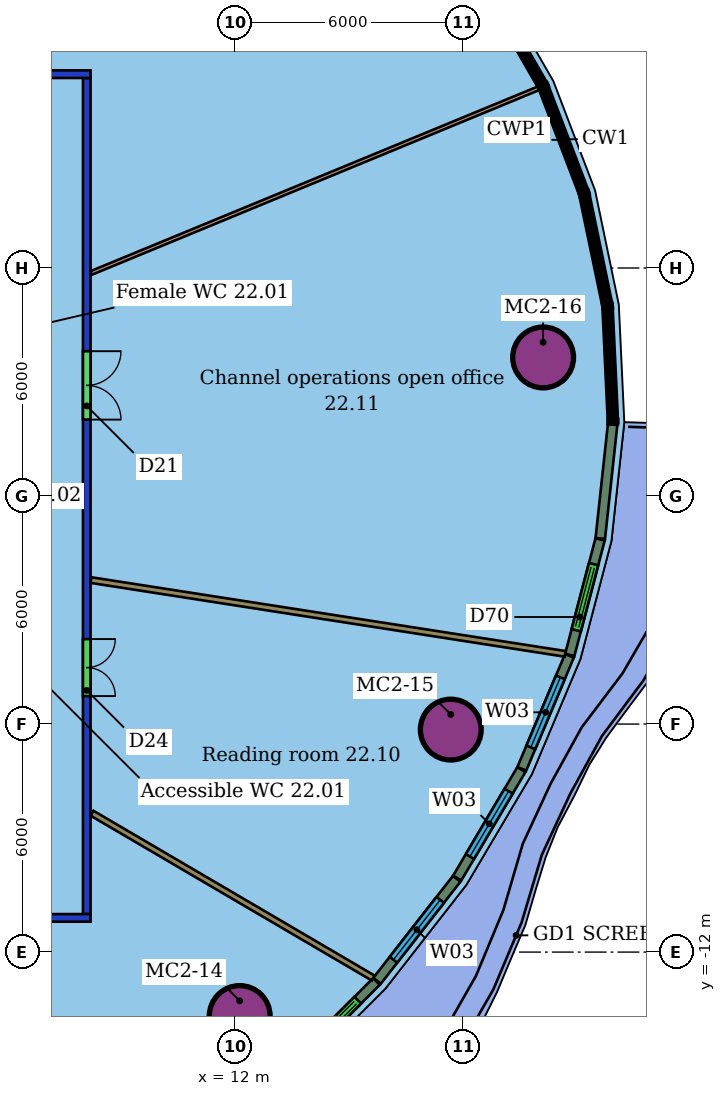
"""IFC4 building model, lengths in metres.
Left out: names, types, materials, properties, quantities, classifications, styles, units other than length and angle.
Written with IfcOpenShell. Run it as: python <this file> out.ifc"""

import sys

from ifc_helpers import new_model, si_unit, direction, frame, frame_2d, origin, origin_2d, place, context, subcontext, project, spatial, rectangle, hollow_circle, extrude, element, fill, save


model = new_model("IFC4")
c1 = context("Model", 3, precision=1e-05, world=origin(), true_north=direction((0.0, 1.0)))
c2 = subcontext(c1, "Body", "Model", "MODEL_VIEW")
j1 = project(units=[si_unit("LENGTHUNIT", "METRE"), si_unit("PLANEANGLEUNIT", "RADIAN")], contexts=[c1])
p1 = place(None, origin())
s1 = spatial("IfcSite", under=j1, at=p1, CompositionType="ELEMENT")
p2 = place(p1, origin())
s2 = spatial("IfcBuilding", under=s1, at=p2, CompositionType="ELEMENT")
p3 = place(p2, frame((0.0, 0.0, 99.4)))
s3 = spatial("IfcBuildingStorey", under=s2, at=p3, CompositionType="ELEMENT", Elevation=99.4)
for number, where, z_axis, x_axis in (
    (1, (12.125, -13.683, 0.0), (0.0, 0.0, 1.0), (1.0, 0.0, 0.0)),
    (2, (17.679, -6.146, 0.0), (0.0, 0.0, 1.0), (1.0, 0.0, 0.0)),
    (3, (20.109, 3.646, 0.0), (0.0, 0.0, 1.0), (1.0, 0.0, 0.0)),
):
    element("IfcColumn", number, at=place(p3, frame(where, z_axis=z_axis, x_axis=x_axis)), inside=s3, PredefinedType="COLUMN", context=c2, shape_type="SweptSolid", body=[
        extrude(hollow_circle(Radius=0.8, WallThickness=0.055, at=origin_2d()), origin(), (0.0, 0.0, 1.0), 3.45),
    ])
p4 = place(p3, frame((8.2, -11.1, 0.0), z_axis=(0.0, 0.0, 1.0), x_axis=(-1.0, 0.0, 0.0)))
e4 = element("IfcWall", 4, at=p4, inside=s3, PredefinedType="PARTITIONING", context=c2, shape_type="SweptSolid", body=[
    extrude(rectangle(XDim=28.4, YDim=0.2, at=frame_2d((14.2, 0.0))), origin(), (0.0, 0.0, 1.0), 3.0),
])
p5 = place(p4, frame((19.333, 0.0, 0.0)))
e5 = element("IfcOpeningElement", 5, at=p5, cuts=e4, PredefinedType="OPENING", context=c2, shape_type="SweptSolid", body=[
    extrude(rectangle(XDim=1.0, YDim=2.1, at=frame_2d((0.5, 1.05))), frame((0.0, 0.11, 0.0), z_axis=(0.0, -1.0, 0.0), x_axis=(1.0, 0.0, 0.0)), (0.0, 0.0, 1.0), 0.22),
])
p6 = place(p4, frame((9.983, 0.0, 0.0)))
e6 = element("IfcOpeningElement", 6, at=p6, cuts=e4, PredefinedType="OPENING", context=c2, shape_type="SweptSolid", body=[
    extrude(rectangle(XDim=1.8, YDim=2.1, at=frame_2d((0.9, 1.05))), frame((0.0, 0.11, 0.0), z_axis=(0.0, -1.0, 0.0), x_axis=(1.0, 0.0, 0.0)), (0.0, 0.0, 1.0), 0.22),
])
p7 = place(p3, frame((-20.2, 11.1, 0.0), z_axis=(0.0, 0.0, 1.0), x_axis=(1.0, 0.0, 0.0)))
e7 = element("IfcWall", 7, at=p7, inside=s3, PredefinedType="PARTITIONING", context=c2, shape_type="SweptSolid", body=[
    extrude(rectangle(XDim=28.4, YDim=0.2, at=frame_2d((14.2, 0.0))), origin(), (0.0, 0.0, 1.0), 3.0),
])
p8 = place(p7, frame((22.072, 0.0, 0.0)))
e8 = element("IfcOpeningElement", 8, at=p8, cuts=e7, PredefinedType="OPENING", context=c2, shape_type="SweptSolid", body=[
    extrude(rectangle(XDim=1.8, YDim=2.1, at=frame_2d((0.9, 1.05))), frame((0.0, 0.11, 0.0), z_axis=(0.0, -1.0, 0.0), x_axis=(1.0, 0.0, 0.0)), (0.0, 0.0, 1.0), 0.22),
])
p9 = place(p7, frame((16.343, 0.0, 0.0)))
e9 = element("IfcOpeningElement", 9, at=p9, cuts=e7, PredefinedType="OPENING", context=c2, shape_type="SweptSolid", body=[
    extrude(rectangle(XDim=1.0, YDim=2.1, at=frame_2d((0.5, 1.05))), frame((0.0, 0.11, 0.0), z_axis=(0.0, -1.0, 0.0), x_axis=(1.0, 0.0, 0.0)), (0.0, 0.0, 1.0), 0.22),
])
p10 = place(p7, frame((7.687, 0.0, 0.0)))
e10 = element("IfcOpeningElement", 10, at=p10, cuts=e7, PredefinedType="OPENING", context=c2, shape_type="SweptSolid", body=[
    extrude(rectangle(XDim=1.0, YDim=2.4, at=frame_2d((0.5, 1.2))), frame((0.0, 0.11, 0.0), z_axis=(0.0, -1.0, 0.0), x_axis=(1.0, 0.0, 0.0)), (0.0, 0.0, 1.0), 0.22),
])
p11 = place(p7, frame((3.746, 0.0, 0.0)))
e11 = element("IfcOpeningElement", 11, at=p11, cuts=e7, PredefinedType="OPENING", context=c2, shape_type="SweptSolid", body=[
    extrude(rectangle(XDim=0.9, YDim=2.1, at=frame_2d((0.45, 1.05))), frame((0.0, 0.11, 0.0), z_axis=(0.0, -1.0, 0.0), x_axis=(1.0, 0.0, 0.0)), (0.0, 0.0, 1.0), 0.22),
])
p12 = place(p3, frame((8.1, 11.0, 0.0), z_axis=(0.0, 0.0, 1.0), x_axis=(0.0, -1.0, 0.0)))
e12 = element("IfcWall", 12, at=p12, inside=s3, PredefinedType="PARTITIONING", context=c2, shape_type="SweptSolid", body=[
    extrude(rectangle(XDim=22.0, YDim=0.2, at=frame_2d((11.0, 0.0))), origin(), (0.0, 0.0, 1.0), 3.0),
])
p13 = place(p12, frame((14.764, 0.0, 0.0)))
e13 = element("IfcOpeningElement", 13, at=p13, cuts=e12, PredefinedType="OPENING", context=c2, shape_type="SweptSolid", body=[
    extrude(rectangle(XDim=1.5, YDim=2.1, at=frame_2d((0.75, 1.05))), frame((0.0, 0.11, 0.0), z_axis=(0.0, -1.0, 0.0), x_axis=(1.0, 0.0, 0.0)), (0.0, 0.0, 1.0), 0.22),
])
p14 = place(p12, frame((7.189, 0.0, 0.0)))
e14 = element("IfcOpeningElement", 14, at=p14, cuts=e12, PredefinedType="OPENING", context=c2, shape_type="SweptSolid", body=[
    extrude(rectangle(XDim=1.8, YDim=2.1, at=frame_2d((0.9, 1.05))), frame((0.0, 0.11, 0.0), z_axis=(0.0, -1.0, 0.0), x_axis=(1.0, 0.0, 0.0)), (0.0, 0.0, 1.0), 0.22),
])
p15 = place(p3, frame((19.996, 10.732, 0.0), z_axis=(0.0, 0.0, 1.0), x_axis=(-0.924331668554, -0.381590050325, 0.0)))
e15 = element("IfcWall", 15, at=p15, inside=s3, PredefinedType="PARTITIONING", context=c2, shape_type="SweptSolid", body=[
    extrude(rectangle(XDim=12.741, YDim=0.1, at=frame_2d((6.371, 0.0))), origin(), (0.0, 0.0, 1.0), 3.45),
])
p16 = place(p3, frame((15.637, -12.683, 0.0), z_axis=(0.0, 0.0, 1.0), x_axis=(-0.862707391, 0.505703428418, 0.0)))
e16 = element("IfcWall", 16, at=p16, inside=s3, PredefinedType="PARTITIONING", context=c2, shape_type="SweptSolid", body=[
    extrude(rectangle(XDim=8.577, YDim=0.15, at=frame_2d((4.289, 0.0))), origin(), (0.0, 0.0, 1.0), 3.45),
])
p17 = place(p3, frame((20.688, -4.153, 0.0), z_axis=(0.0, 0.0, 1.0), x_axis=(-0.988106221153, 0.153772870555, 0.0)))
e17 = element("IfcWall", 17, at=p17, inside=s3, PredefinedType="PARTITIONING", context=c2, shape_type="SweptSolid", body=[
    extrude(rectangle(XDim=12.627, YDim=0.15, at=frame_2d((6.313, 0.0))), origin(), (0.0, 0.0, 1.0), 3.45),
])
p18 = place(p3, frame((13.255, -15.243, 0.0), z_axis=(0.0, 0.0, 1.0), x_axis=(0.706861980523, 0.70735149713, 0.0)))
e18 = element("IfcWall", 18, at=p18, inside=s3, PredefinedType="SOLIDWALL", context=c2, shape_type="SweptSolid", body=[
    extrude(rectangle(XDim=3.491, YDim=0.25, at=frame_2d((1.746, 0.0))), origin(), (0.0, 0.0, 1.0), 3.05),
])
p19 = place(p18, frame((0.996, 0.0, 0.0)))
e19 = element("IfcOpeningElement", 19, at=p19, cuts=e18, PredefinedType="OPENING", context=c2, shape_type="SweptSolid", body=[
    extrude(rectangle(XDim=1.8, YDim=2.4, at=frame_2d((0.9, 1.2))), frame((0.0, 0.135, 0.0), z_axis=(0.0, -1.0, 0.0), x_axis=(1.0, 0.0, 0.0)), (0.0, 0.0, 1.0), 0.27),
])
p20 = place(p3, frame((15.738, -12.757, 0.0), z_axis=(0.0, 0.0, 1.0), x_axis=(0.615358853005, 0.788247094525, 0.0)))
e20 = element("IfcWall", 20, at=p20, inside=s3, PredefinedType="SOLIDWALL", context=c2, shape_type="SweptSolid", body=[
    extrude(rectangle(XDim=3.406, YDim=0.25, at=frame_2d((1.703, 0.0))), origin(), (0.0, 0.0, 1.0), 3.05),
])
p21 = place(p20, frame((0.703, 0.0, 0.9)))
e21 = element("IfcOpeningElement", 21, at=p21, cuts=e20, PredefinedType="OPENING", context=c2, shape_type="SweptSolid", body=[
    extrude(rectangle(XDim=2.0, YDim=2.1, at=frame_2d((1.0, 1.05))), frame((0.0, 0.135, 0.0), z_axis=(0.0, -1.0, 0.0), x_axis=(1.0, 0.0, 0.0)), (0.0, 0.0, 1.0), 0.27),
])
p22 = place(p3, frame((17.848, -10.052, 0.0), z_axis=(0.0, 0.0, 1.0), x_axis=(0.509364300132, 0.860550991953, 0.0)))
e22 = element("IfcWall", 22, at=p22, inside=s3, PredefinedType="SOLIDWALL", context=c2, shape_type="SweptSolid", body=[
    extrude(rectangle(XDim=3.315, YDim=0.25, at=frame_2d((1.658, 0.0))), origin(), (0.0, 0.0, 1.0), 3.05),
])
p23 = place(p22, frame((0.658, 0.0, 0.9)))
e23 = element("IfcOpeningElement", 23, at=p23, cuts=e22, PredefinedType="OPENING", context=c2, shape_type="SweptSolid", body=[
    extrude(rectangle(XDim=2.0, YDim=2.1, at=frame_2d((1.0, 1.05))), frame((0.0, 0.135, 0.0), z_axis=(0.0, -1.0, 0.0), x_axis=(1.0, 0.0, 0.0)), (0.0, 0.0, 1.0), 0.27),
])
p24 = place(p3, frame((19.548, -7.177, 0.0), z_axis=(0.0, 0.0, 1.0), x_axis=(0.388723599909, 0.921354417623, 0.0)))
e24 = element("IfcWall", 24, at=p24, inside=s3, PredefinedType="SOLIDWALL", context=c2, shape_type="SweptSolid", body=[
    extrude(rectangle(XDim=3.225, YDim=0.25, at=frame_2d((1.613, 0.0))), origin(), (0.0, 0.0, 1.0), 3.05),
])
p25 = place(p24, frame((0.613, 0.0, 0.9)))
e25 = element("IfcOpeningElement", 25, at=p25, cuts=e24, PredefinedType="OPENING", context=c2, shape_type="SweptSolid", body=[
    extrude(rectangle(XDim=2.0, YDim=2.1, at=frame_2d((1.0, 1.05))), frame((0.0, 0.135, 0.0), z_axis=(0.0, -1.0, 0.0), x_axis=(1.0, 0.0, 0.0)), (0.0, 0.0, 1.0), 0.27),
])
p26 = place(p3, frame((20.81, -4.181, 0.0), z_axis=(0.0, 0.0, 1.0), x_axis=(0.25414525883, 0.967166059896, 0.0)))
e26 = element("IfcWall", 26, at=p26, inside=s3, PredefinedType="SOLIDWALL", context=c2, shape_type="SweptSolid", body=[
    extrude(rectangle(XDim=3.142, YDim=0.25, at=frame_2d((1.571, 0.0))), origin(), (0.0, 0.0, 1.0), 3.05),
])
p27 = place(p26, frame((0.671, 0.0, 0.0)))
e27 = element("IfcOpeningElement", 27, at=p27, cuts=e26, PredefinedType="OPENING", context=c2, shape_type="SweptSolid", body=[
    extrude(rectangle(XDim=1.8, YDim=2.4, at=frame_2d((0.9, 1.2))), frame((0.0, 0.135, 0.0), z_axis=(0.0, -1.0, 0.0), x_axis=(1.0, 0.0, 0.0)), (0.0, 0.0, 1.0), 0.27),
])
p28 = place(p3, frame((21.613, -1.116, 0.0), z_axis=(0.0, 0.0, 1.0), x_axis=(0.107752917702, 0.994177704803, 0.0)))
e28 = element("IfcWall", 28, at=p28, inside=s3, PredefinedType="SOLIDWALL", context=c2, shape_type="SweptSolid", body=[
    extrude(rectangle(XDim=3.031, YDim=0.25, at=frame_2d((1.516, 0.0))), origin(), (0.0, 0.0, 1.0), 3.05),
])
p29 = place(p13, origin())
e29 = element("IfcDoor", 29, at=p29, inside=s3, OperationType="DOUBLE_DOOR_SINGLE_SWING", PredefinedType="DOOR", context=c2, shape_type="SweptSolid", body=[
    extrude(rectangle(XDim=1.5, YDim=2.1, at=frame_2d((0.75, 1.05))), frame((0.0, 0.025, 0.0), z_axis=(0.0, -1.0, 0.0), x_axis=(1.0, 0.0, 0.0)), (0.0, 0.0, 1.0), 0.05),
])
fill(e13, e29)
p30 = place(p14, origin())
e30 = element("IfcDoor", 30, at=p30, inside=s3, OperationType="DOUBLE_DOOR_SINGLE_SWING", PredefinedType="DOOR", context=c2, shape_type="SweptSolid", body=[
    extrude(rectangle(XDim=1.8, YDim=2.1, at=frame_2d((0.9, 1.05))), frame((0.0, 0.025, 0.0), z_axis=(0.0, -1.0, 0.0), x_axis=(1.0, 0.0, 0.0)), (0.0, 0.0, 1.0), 0.05),
])
fill(e14, e30)
p31 = place(p19, origin())
e31 = element("IfcDoor", 31, at=p31, inside=s3, OperationType="DOUBLE_DOOR_SLIDING", PredefinedType="DOOR", context=c2, shape_type="SweptSolid", body=[
    extrude(rectangle(XDim=1.8, YDim=2.4, at=frame_2d((0.9, 1.2))), frame((0.0, 0.025, 0.0), z_axis=(0.0, -1.0, 0.0), x_axis=(1.0, 0.0, 0.0)), (0.0, 0.0, 1.0), 0.05),
])
fill(e19, e31)
p32 = place(p21, origin())
e32 = element("IfcWindow", 32, at=p32, inside=s3, PartitioningType="SINGLE_PANEL", PredefinedType="WINDOW", context=c2, shape_type="SweptSolid", body=[
    extrude(rectangle(XDim=2.0, YDim=2.1, at=frame_2d((1.0, 1.05))), frame((0.0, 0.03, 0.0), z_axis=(0.0, -1.0, 0.0), x_axis=(1.0, 0.0, 0.0)), (0.0, 0.0, 1.0), 0.06),
])
fill(e21, e32)
p33 = place(p23, origin())
e33 = element("IfcWindow", 33, at=p33, inside=s3, PartitioningType="SINGLE_PANEL", PredefinedType="WINDOW", context=c2, shape_type="SweptSolid", body=[
    extrude(rectangle(XDim=2.0, YDim=2.1, at=frame_2d((1.0, 1.05))), frame((0.0, 0.03, 0.0), z_axis=(0.0, -1.0, 0.0), x_axis=(1.0, 0.0, 0.0)), (0.0, 0.0, 1.0), 0.06),
])
fill(e23, e33)
p34 = place(p25, origin())
e34 = element("IfcWindow", 34, at=p34, inside=s3, PartitioningType="SINGLE_PANEL", PredefinedType="WINDOW", context=c2, shape_type="SweptSolid", body=[
    extrude(rectangle(XDim=2.0, YDim=2.1, at=frame_2d((1.0, 1.05))), frame((0.0, 0.03, 0.0), z_axis=(0.0, -1.0, 0.0), x_axis=(1.0, 0.0, 0.0)), (0.0, 0.0, 1.0), 0.06),
])
fill(e25, e34)
p35 = place(p27, origin())
e35 = element("IfcDoor", 35, at=p35, inside=s3, OperationType="DOUBLE_DOOR_SLIDING", PredefinedType="DOOR", context=c2, shape_type="SweptSolid", body=[
    extrude(rectangle(XDim=1.8, YDim=2.4, at=frame_2d((0.9, 1.2))), frame((0.0, 0.025, 0.0), z_axis=(0.0, -1.0, 0.0), x_axis=(1.0, 0.0, 0.0)), (0.0, 0.0, 1.0), 0.05),
])
fill(e27, e35)
save(model, sys.argv[1])
